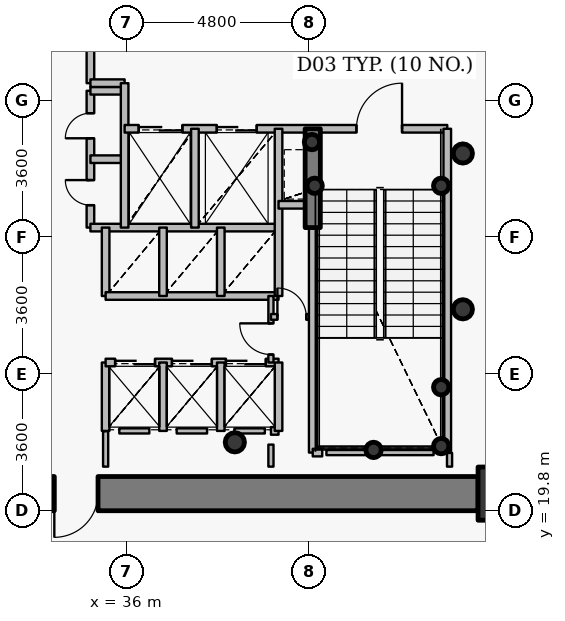
"""IFC4 building model, lengths in metres.
Left out: names, types, materials, properties, quantities, classifications, styles, units other than length and angle.
Written with IfcOpenShell. Run it as: python <this file> out.ifc"""

import sys

from ifc_helpers import new_model, si_unit, direction, frame, frame_2d, origin, origin_2d, place, context, subcontext, project, spatial, rectangle, hollow_circle, extrude, source, transform, mapped, element, fill, save


model = new_model("IFC4")
c1 = context("Model", 3, precision=1e-05, world=origin(), true_north=direction((0.0, 1.0)))
c2 = subcontext(c1, "Body", "Model", "MODEL_VIEW")
j1 = project(units=[si_unit("LENGTHUNIT", "METRE"), si_unit("PLANEANGLEUNIT", "RADIAN")], contexts=[c1])
p1 = place(None, origin())
s1 = spatial("IfcSite", under=j1, at=p1, CompositionType="ELEMENT")
p2 = place(p1, origin())
s2 = spatial("IfcBuilding", under=s1, at=p2, CompositionType="ELEMENT")
p3 = place(p2, frame((0.0, 0.0, 61.8)))
s3 = spatial("IfcBuildingStorey", under=s2, at=p3, CompositionType="ELEMENT", Elevation=61.8)
p4 = place(p3, frame((45.95, 20.25, 0.0), z_axis=(0.0, 0.0, 1.0), x_axis=(1.0, 0.0, 0.0)))
e1 = element("IfcColumn", 1, at=p4, inside=s3, PredefinedType="COLUMN", context=c2, shape_type="SweptSolid", body=[
    extrude(rectangle(XDim=1.4, YDim=1.4, at=origin_2d()), origin(), (0.0, 0.0, 1.0), 4.2),
])
p5 = place(p3, frame((38.85, 21.6, 0.0), z_axis=(0.0, 0.0, 1.0), x_axis=(1.0, 0.0, 0.0)))
e2 = element("IfcColumn", 2, at=p5, inside=s3, PredefinedType="COLUMN", context=c2, shape_type="SweptSolid", body=[
    extrude(hollow_circle(Radius=0.254, WallThickness=0.02, at=origin_2d()), origin(), (0.0, 0.0, 1.0), 4.2),
])
for number, where, z_axis, x_axis in (
    (3, (44.28, 21.5, 0.0), (0.0, 0.0, 1.0), (1.0, 0.0, 0.0)),
    (4, (44.28, 23.05, 0.0), (0.0, 0.0, 1.0), (1.0, 0.0, 0.0)),
    (5, (42.5, 21.4, 0.0), (0.0, 0.0, 1.0), (1.0, 0.0, 0.0)),
    (6, (40.95, 28.35, 0.0), (0.0, 0.0, 1.0), (1.0, 0.0, 0.0)),
    (7, (44.28, 28.35, 0.0), (0.0, 0.0, 1.0), (1.0, 0.0, 0.0)),
    (8, (40.88, 29.5, 0.0), (0.0, 0.0, 1.0), (1.0, 0.0, 0.0)),
):
    element("IfcColumn", number, at=place(p3, frame(where, z_axis=z_axis, x_axis=x_axis)), inside=s3, PredefinedType="COLUMN", context=c2, shape_type="SweptSolid", body=[
        extrude(hollow_circle(Radius=0.203, WallThickness=0.016, at=origin_2d()), origin(), (0.0, 0.0, 1.0), 4.2),
    ])
p6 = place(p3, frame((45.25, 20.25, 0.0), z_axis=(0.0, 0.0, 1.0), x_axis=(-1.0, 0.0, 0.0)))
e9 = element("IfcWall", 9, at=p6, inside=s3, PredefinedType="SHEAR", context=c2, shape_type="SweptSolid", body=[
    extrude(rectangle(XDim=18.5, YDim=0.9, at=frame_2d((9.25, 0.0))), origin(), (0.0, 0.0, 1.0), 3.4),
])
p7 = place(p6, frame((10.0, 0.0, 0.0)))
e10 = element("IfcOpeningElement", 10, at=p7, cuts=e9, PredefinedType="OPENING", context=c2, shape_type="SweptSolid", body=[
    extrude(rectangle(XDim=1.15, YDim=2.15, at=origin_2d()), frame((0.575, 0.46, 1.075), z_axis=(0.0, -1.0, 0.0), x_axis=(1.0, 0.0, 0.0)), (0.0, 0.0, 1.0), 0.92),
])
p8 = place(p3, frame((40.9, 27.25, 0.0), z_axis=(0.0, 0.0, 1.0), x_axis=(0.0, 1.0, 0.0)))
e11 = element("IfcWall", 11, at=p8, inside=s3, PredefinedType="SHEAR", context=c2, shape_type="SweptSolid", body=[
    extrude(rectangle(XDim=2.6, YDim=0.4, at=frame_2d((1.3, 0.0))), origin(), (0.0, 0.0, 1.0), 3.55),
])
for number, where, z_axis, x_axis in (
    (12, (44.85, 25.1, 0.0), (0.0, 0.0, 1.0), (1.0, 0.0, 0.0)),
    (13, (44.85, 29.2, 0.0), (0.0, 0.0, 1.0), (1.0, 0.0, 0.0)),
):
    element("IfcColumn", number, at=place(p3, frame(where, z_axis=z_axis, x_axis=x_axis)), inside=s3, PredefinedType="COLUMN", context=c2, shape_type="SweptSolid", body=[
        extrude(hollow_circle(Radius=0.254, WallThickness=0.02, at=origin_2d()), origin(), (0.0, 0.0, 1.0), 4.2),
    ])
p9 = place(p3, frame((35.05, 27.25, 0.0), z_axis=(0.0, 0.0, 1.0), x_axis=(0.0, 1.0, 0.0)))
e14 = element("IfcWall", 14, at=p9, inside=s3, PredefinedType="PARTITIONING", context=c2, shape_type="SweptSolid", body=[
    extrude(rectangle(XDim=3.6, YDim=0.2, at=frame_2d((1.8, 0.0))), origin(), (0.0, 0.0, 1.0), 3.95),
])
p10 = place(p9, frame((0.59, 0.0, 0.0)))
e15 = element("IfcOpeningElement", 15, at=p10, cuts=e14, PredefinedType="OPENING", context=c2, shape_type="SweptSolid", body=[
    extrude(rectangle(XDim=0.66, YDim=2.05, at=origin_2d()), frame((0.33, 0.11, 1.025), z_axis=(0.0, -1.0, 0.0), x_axis=(1.0, 0.0, 0.0)), (0.0, 0.0, 1.0), 0.22),
])
p11 = place(p9, frame((2.35, 0.0, 0.0)))
e16 = element("IfcOpeningElement", 16, at=p11, cuts=e14, PredefinedType="OPENING", context=c2, shape_type="SweptSolid", body=[
    extrude(rectangle(XDim=0.66, YDim=2.05, at=origin_2d()), frame((0.33, 0.11, 1.025), z_axis=(0.0, -1.0, 0.0), x_axis=(1.0, 0.0, 0.0)), (0.0, 0.0, 1.0), 0.22),
])
p12 = place(p3, frame((35.05, 27.25, 0.0), z_axis=(0.0, 0.0, 1.0), x_axis=(1.0, 0.0, 0.0)))
e17 = element("IfcWall", 17, at=p12, inside=s3, PredefinedType="PARTITIONING", context=c2, shape_type="SweptSolid", body=[
    extrude(rectangle(XDim=4.95, YDim=0.2, at=frame_2d((2.475, 0.0))), origin(), (0.0, 0.0, 1.0), 3.535),
])
for number, where, z_axis, x_axis in (
    (18, (35.05, 29.05, 0.0), (0.0, 0.0, 1.0), (1.0, 0.0, 0.0)),
    (19, (35.05, 30.85, 0.0), (0.0, 0.0, 1.0), (1.0, 0.0, 0.0)),
):
    element("IfcWall", number, at=place(p3, frame(where, z_axis=z_axis, x_axis=x_axis)), inside=s3, PredefinedType="PARTITIONING", context=c2, shape_type="SweptSolid", body=[
        extrude(rectangle(XDim=0.9, YDim=0.2, at=frame_2d((0.45, 0.0))), origin(), (0.0, 0.0, 1.0), 3.95),
    ])
p13 = place(p3, frame((35.05, 31.05, 0.0), z_axis=(0.0, 0.0, 1.0), x_axis=(0.0, 1.0, 0.0)))
e20 = element("IfcWall", 20, at=p13, inside=s3, PredefinedType="PARTITIONING", context=c2, shape_type="SweptSolid", body=[
    extrude(rectangle(XDim=2.25, YDim=0.2, at=frame_2d((1.125, 0.0))), origin(), (0.0, 0.0, 1.0), 3.535),
])
p14 = place(p3, frame((35.05, 31.05, 0.0), z_axis=(0.0, 0.0, 1.0), x_axis=(1.0, 0.0, 0.0)))
e21 = element("IfcWall", 21, at=p14, inside=s3, PredefinedType="PARTITIONING", context=c2, shape_type="SweptSolid", body=[
    extrude(rectangle(XDim=0.9, YDim=0.2, at=frame_2d((0.45, 0.0))), origin(), (0.0, 0.0, 1.0), 3.95),
])
p15 = place(p3, frame((35.45, 21.9, 0.0), z_axis=(0.0, 0.0, 1.0), x_axis=(0.0, 1.0, 0.0)))
e22 = element("IfcWall", 22, at=p15, inside=s3, PredefinedType="PARTITIONING", context=c2, shape_type="SweptSolid", body=[
    extrude(rectangle(XDim=1.8, YDim=0.2, at=frame_2d((0.9, 0.0))), origin(), (0.0, 0.0, 1.0), 3.95),
])
p16 = place(p3, frame((35.45, 23.7, 0.0), z_axis=(0.0, 0.0, 1.0), x_axis=(1.0, 0.0, 0.0)))
e23 = element("IfcWall", 23, at=p16, inside=s3, PredefinedType="PARTITIONING", context=c2, shape_type="SweptSolid", body=[
    extrude(rectangle(XDim=4.55, YDim=0.2, at=frame_2d((2.275, 0.0))), origin(), (0.0, 0.0, 1.0), 3.535),
])
p17 = place(p16, frame((0.25, 0.0, 0.0)))
e24 = element("IfcOpeningElement", 24, at=p17, cuts=e23, PredefinedType="OPENING", context=c2, shape_type="SweptSolid", body=[
    extrude(rectangle(XDim=1.05, YDim=2.15, at=origin_2d()), frame((0.525, 0.11, 1.075), z_axis=(0.0, -1.0, 0.0), x_axis=(1.0, 0.0, 0.0)), (0.0, 0.0, 1.0), 0.22),
])
p18 = place(p16, frame((1.745, 0.0, 0.0)))
e25 = element("IfcOpeningElement", 25, at=p18, cuts=e23, PredefinedType="OPENING", context=c2, shape_type="SweptSolid", body=[
    extrude(rectangle(XDim=1.05, YDim=2.15, at=origin_2d()), frame((0.525, 0.11, 1.075), z_axis=(0.0, -1.0, 0.0), x_axis=(1.0, 0.0, 0.0)), (0.0, 0.0, 1.0), 0.22),
])
p19 = place(p16, frame((3.165, 0.0, 0.0)))
e26 = element("IfcOpeningElement", 26, at=p19, cuts=e23, PredefinedType="OPENING", context=c2, shape_type="SweptSolid", body=[
    extrude(rectangle(XDim=1.05, YDim=2.15, at=origin_2d()), frame((0.525, 0.11, 1.075), z_axis=(0.0, -1.0, 0.0), x_axis=(1.0, 0.0, 0.0)), (0.0, 0.0, 1.0), 0.22),
])
p20 = place(p3, frame((35.45, 25.45, 0.0), z_axis=(0.0, 0.0, 1.0), x_axis=(0.0, 1.0, 0.0)))
e27 = element("IfcWall", 27, at=p20, inside=s3, PredefinedType="PARTITIONING", context=c2, shape_type="SweptSolid", body=[
    extrude(rectangle(XDim=1.8, YDim=0.2, at=frame_2d((0.9, 0.0))), origin(), (0.0, 0.0, 1.0), 3.95),
])
p21 = place(p3, frame((35.45, 25.45, 0.0), z_axis=(0.0, 0.0, 1.0), x_axis=(1.0, 0.0, 0.0)))
e28 = element("IfcWall", 28, at=p21, inside=s3, PredefinedType="PARTITIONING", context=c2, shape_type="SweptSolid", body=[
    extrude(rectangle(XDim=4.55, YDim=0.2, at=frame_2d((2.275, 0.0))), origin(), (0.0, 0.0, 1.0), 3.535),
])
p22 = place(p3, frame((35.95, 27.25, 0.0), z_axis=(0.0, 0.0, 1.0), x_axis=(0.0, 1.0, 0.0)))
e29 = element("IfcWall", 29, at=p22, inside=s3, PredefinedType="PARTITIONING", context=c2, shape_type="SweptSolid", body=[
    extrude(rectangle(XDim=3.8, YDim=0.2, at=frame_2d((1.9, 0.0))), origin(), (0.0, 0.0, 1.0), 3.95),
])
p23 = place(p3, frame((35.95, 29.85, 0.0), z_axis=(0.0, 0.0, 1.0), x_axis=(1.0, 0.0, 0.0)))
e30 = element("IfcWall", 30, at=p23, inside=s3, PredefinedType="PARTITIONING", context=c2, shape_type="SweptSolid", body=[
    extrude(rectangle(XDim=8.49, YDim=0.2, at=frame_2d((4.245, 0.0))), origin(), (0.0, 0.0, 1.0), 3.535),
])
p24 = place(p23, frame((6.1, 0.0, 0.0)))
e31 = element("IfcOpeningElement", 31, at=p24, cuts=e30, PredefinedType="OPENING", context=c2, shape_type="SweptSolid", body=[
    extrude(rectangle(XDim=1.2, YDim=2.15, at=origin_2d()), frame((0.6, 0.11, 1.075), z_axis=(0.0, -1.0, 0.0), x_axis=(1.0, 0.0, 0.0)), (0.0, 0.0, 1.0), 0.22),
])
p25 = place(p23, frame((0.37, 0.0, 0.0)))
e32 = element("IfcOpeningElement", 32, at=p25, cuts=e30, PredefinedType="OPENING", context=c2, shape_type="SweptSolid", body=[
    extrude(rectangle(XDim=1.15, YDim=2.15, at=origin_2d()), frame((0.575, 0.11, 1.075), z_axis=(0.0, -1.0, 0.0), x_axis=(1.0, 0.0, 0.0)), (0.0, 0.0, 1.0), 0.22),
])
p26 = place(p23, frame((2.425, 0.0, 0.0)))
e33 = element("IfcOpeningElement", 33, at=p26, cuts=e30, PredefinedType="OPENING", context=c2, shape_type="SweptSolid", body=[
    extrude(rectangle(XDim=1.05, YDim=2.15, at=origin_2d()), frame((0.525, 0.11, 1.075), z_axis=(0.0, -1.0, 0.0), x_axis=(1.0, 0.0, 0.0)), (0.0, 0.0, 1.0), 0.22),
])
for number, where, z_axis, x_axis in (
    (34, (36.96, 21.9, 0.0), (0.0, 0.0, 1.0), (0.0, 1.0, 0.0)),
    (35, (36.96, 25.45, 0.0), (0.0, 0.0, 1.0), (0.0, 1.0, 0.0)),
):
    element("IfcWall", number, at=place(p3, frame(where, z_axis=z_axis, x_axis=x_axis)), inside=s3, PredefinedType="PARTITIONING", context=c2, shape_type="SweptSolid", body=[
        extrude(rectangle(XDim=1.8, YDim=0.2, at=frame_2d((0.9, 0.0))), origin(), (0.0, 0.0, 1.0), 3.95),
    ])
p27 = place(p3, frame((37.8, 27.25, 0.0), z_axis=(0.0, 0.0, 1.0), x_axis=(0.0, 1.0, 0.0)))
e36 = element("IfcWall", 36, at=p27, inside=s3, PredefinedType="PARTITIONING", context=c2, shape_type="SweptSolid", body=[
    extrude(rectangle(XDim=2.6, YDim=0.2, at=frame_2d((1.3, 0.0))), origin(), (0.0, 0.0, 1.0), 3.95),
])
for number, where, z_axis, x_axis in (
    (37, (38.48, 21.9, 0.0), (0.0, 0.0, 1.0), (0.0, 1.0, 0.0)),
    (38, (38.48, 25.45, 0.0), (0.0, 0.0, 1.0), (0.0, 1.0, 0.0)),
):
    element("IfcWall", number, at=place(p3, frame(where, z_axis=z_axis, x_axis=x_axis)), inside=s3, PredefinedType="PARTITIONING", context=c2, shape_type="SweptSolid", body=[
        extrude(rectangle(XDim=1.8, YDim=0.2, at=frame_2d((0.9, 0.0))), origin(), (0.0, 0.0, 1.0), 3.95),
    ])
p28 = place(p3, frame((39.8, 21.9, 0.0), z_axis=(0.0, 0.0, 1.0), x_axis=(1.0, 0.0, 0.0)))
e39 = element("IfcWall", 39, at=p28, inside=s3, PredefinedType="PARTITIONING", context=c2, shape_type="SweptSolid", body=[
    extrude(rectangle(XDim=0.2, YDim=0.2, at=frame_2d((0.1, 0.0))), origin(), (0.0, 0.0, 1.0), 3.95),
])
p29 = place(p3, frame((39.8, 23.7, 0.0), z_axis=(0.0, 0.0, 1.0), x_axis=(0.0, 1.0, 0.0)))
e40 = element("IfcWall", 40, at=p29, inside=s3, PredefinedType="PARTITIONING", context=c2, shape_type="SweptSolid", body=[
    extrude(rectangle(XDim=1.75, YDim=0.135, at=frame_2d((0.875, 0.0))), origin(), (0.0, 0.0, 1.0), 3.95),
])
p30 = place(p29, frame((0.21, 0.0, 0.0)))
e41 = element("IfcOpeningElement", 41, at=p30, cuts=e40, PredefinedType="OPENING", context=c2, shape_type="SweptSolid", body=[
    extrude(rectangle(XDim=0.82, YDim=2.1, at=origin_2d()), frame((0.41, 0.078, 1.05), z_axis=(0.0, -1.0, 0.0), x_axis=(1.0, 0.0, 0.0)), (0.0, 0.0, 1.0), 0.155),
])
p31 = place(p3, frame((39.8, 24.9, 0.0), z_axis=(0.0, 0.0, 1.0), x_axis=(1.0, 0.0, 0.0)))
e42 = element("IfcWall", 42, at=p31, inside=s3, PredefinedType="PARTITIONING", context=c2, shape_type="SweptSolid", body=[
    extrude(rectangle(XDim=1.1, YDim=0.15, at=frame_2d((0.55, 0.0))), origin(), (0.0, 0.0, 1.0), 3.95),
])
p32 = place(p31, frame((0.17, 0.0, 0.0)))
e43 = element("IfcOpeningElement", 43, at=p32, cuts=e42, PredefinedType="OPENING", context=c2, shape_type="SweptSolid", body=[
    extrude(rectangle(XDim=0.76, YDim=2.1, at=origin_2d()), frame((0.38, 0.085, 1.05), z_axis=(0.0, -1.0, 0.0), x_axis=(1.0, 0.0, 0.0)), (0.0, 0.0, 1.0), 0.17),
])
p33 = place(p3, frame((40.0, 21.9, 0.0), z_axis=(0.0, 0.0, 1.0), x_axis=(0.0, 1.0, 0.0)))
e44 = element("IfcWall", 44, at=p33, inside=s3, PredefinedType="PARTITIONING", context=c2, shape_type="SweptSolid", body=[
    extrude(rectangle(XDim=1.8, YDim=0.2, at=frame_2d((0.9, 0.0))), origin(), (0.0, 0.0, 1.0), 3.95),
])
p34 = place(p3, frame((40.0, 25.45, 0.0), z_axis=(0.0, 0.0, 1.0), x_axis=(0.0, 1.0, 0.0)))
e45 = element("IfcWall", 45, at=p34, inside=s3, PredefinedType="PARTITIONING", context=c2, shape_type="SweptSolid", body=[
    extrude(rectangle(XDim=4.4, YDim=0.2, at=frame_2d((2.2, 0.0))), origin(), (0.0, 0.0, 1.0), 3.95),
])
p35 = place(p3, frame((40.0, 27.85, 0.0), z_axis=(0.0, 0.0, 1.0), x_axis=(1.0, 0.0, 0.0)))
e46 = element("IfcWall", 46, at=p35, inside=s3, PredefinedType="PARTITIONING", context=c2, shape_type="SweptSolid", body=[
    extrude(rectangle(XDim=0.9, YDim=0.2, at=frame_2d((0.45, 0.0))), origin(), (0.0, 0.0, 1.0), 3.95),
])
p36 = place(p3, frame((40.9, 21.33, 0.0), z_axis=(0.0, 0.0, 1.0), x_axis=(0.0, 1.0, 0.0)))
e47 = element("IfcWall", 47, at=p36, inside=s3, PredefinedType="PARTITIONING", context=c2, shape_type="SweptSolid", body=[
    extrude(rectangle(XDim=5.91, YDim=0.2, at=frame_2d((2.955, 0.0))), origin(), (0.0, 0.0, 1.0), 3.485),
])
p37 = place(p3, frame((40.9, 21.33, 0.0), z_axis=(0.0, 0.0, 1.0), x_axis=(1.0, 0.0, 0.0)))
e48 = element("IfcWall", 48, at=p37, inside=s3, PredefinedType="PARTITIONING", context=c2, shape_type="SweptSolid", body=[
    extrude(rectangle(XDim=0.25, YDim=0.2, at=frame_2d((0.125, 0.0))), origin(), (0.0, 0.0, 1.0), 3.485),
])
p38 = place(p3, frame((44.44, 21.33, 0.0), z_axis=(0.0, 0.0, 1.0), x_axis=(0.0, 1.0, 0.0)))
e49 = element("IfcWall", 49, at=p38, inside=s3, PredefinedType="PARTITIONING", context=c2, shape_type="SweptSolid", body=[
    extrude(rectangle(XDim=8.52, YDim=0.2, at=frame_2d((4.26, 0.0))), origin(), (0.0, 0.0, 1.0), 3.95),
])
p39 = place(p3, frame((44.08, 21.33, 0.0), z_axis=(0.0, 0.0, 1.0), x_axis=(-1.0, 0.0, 0.0)))
e50 = element("IfcWall", 50, at=p39, inside=s3, PredefinedType="PARTITIONING", context=c2, shape_type="SweptSolid", body=[
    extrude(rectangle(XDim=2.82, YDim=0.135, at=frame_2d((1.41, 0.0))), origin(), (0.0, 0.0, 1.0), 3.485),
])
p40 = place(p3, frame((36.6, 21.9, 0.0), z_axis=(0.0, 0.0, 1.0), x_axis=(-1.0, 0.0, 0.0)))
e51 = element("IfcWall", 51, at=p40, inside=s3, PredefinedType="PARTITIONING", context=c2, shape_type="SweptSolid", body=[
    extrude(rectangle(XDim=0.79, YDim=0.135, at=frame_2d((0.395, 0.0))), origin(), (0.0, 0.0, 1.0), 3.95),
])
p41 = place(p3, frame((38.12, 21.9, 0.0), z_axis=(0.0, 0.0, 1.0), x_axis=(-1.0, 0.0, 0.0)))
e52 = element("IfcWall", 52, at=p41, inside=s3, PredefinedType="PARTITIONING", context=c2, shape_type="SweptSolid", body=[
    extrude(rectangle(XDim=0.8, YDim=0.135, at=frame_2d((0.4, 0.0))), origin(), (0.0, 0.0, 1.0), 3.95),
])
p42 = place(p3, frame((39.64, 21.9, 0.0), z_axis=(0.0, 0.0, 1.0), x_axis=(-1.0, 0.0, 0.0)))
e53 = element("IfcWall", 53, at=p42, inside=s3, PredefinedType="PARTITIONING", context=c2, shape_type="SweptSolid", body=[
    extrude(rectangle(XDim=0.8, YDim=0.135, at=frame_2d((0.4, 0.0))), origin(), (0.0, 0.0, 1.0), 3.535),
])
p43 = place(p3, frame((39.8, 20.96, 0.0), z_axis=(0.0, 0.0, 1.0), x_axis=(0.0, 1.0, 0.0)))
e54 = element("IfcWall", 54, at=p43, inside=s3, PredefinedType="PARTITIONING", context=c2, shape_type="SweptSolid", body=[
    extrude(rectangle(XDim=0.58, YDim=0.135, at=frame_2d((0.29, 0.0))), origin(), (0.0, 0.0, 1.0), 3.485),
])
p44 = place(p3, frame((44.5, 20.96, 0.0), z_axis=(0.0, 0.0, 1.0), x_axis=(0.0, 1.0, 0.0)))
e55 = element("IfcWall", 55, at=p44, inside=s3, PredefinedType="PARTITIONING", context=c2, shape_type="SweptSolid", body=[
    extrude(rectangle(XDim=0.36, YDim=0.135, at=frame_2d((0.18, 0.0))), origin(), (0.0, 0.0, 1.0), 3.95),
])
p45 = place(p3, frame((35.45, 21.89, 0.0), z_axis=(0.0, 0.0, 1.0), x_axis=(0.0, -1.0, 0.0)))
e56 = element("IfcWall", 56, at=p45, inside=s3, PredefinedType="PARTITIONING", context=c2, shape_type="SweptSolid", body=[
    extrude(rectangle(XDim=0.93, YDim=0.135, at=frame_2d((0.465, 0.0))), origin(), (0.0, 0.0, 1.0), 3.535),
])
p46 = place(p3, frame((45.26, 19.8, 0.0), z_axis=(0.0, 0.0, 1.0), x_axis=(1.0, 0.0, 0.0)))
e57 = element("IfcWall", 57, at=p46, inside=s3, PredefinedType="PARTITIONING", context=c2, shape_type="SweptSolid", body=[
    extrude(rectangle(XDim=1.14, YDim=0.135, at=frame_2d((0.57, 0.0))), origin(), (0.0, 0.0, 1.0), 3.285),
])
m1 = source(origin(), c2, "Body", "SweptSolid", [
    extrude(rectangle(XDim=1.15, YDim=2.15, at=origin_2d()), frame((0.575, 0.025, 1.075), z_axis=(0.0, -1.0, 0.0), x_axis=(1.0, 0.0, 0.0)), (0.0, 0.0, 1.0), 0.05),
])
p47 = place(p7, origin())
e58 = element("IfcDoor", 58, at=p47, inside=s3, OperationType="SINGLE_SWING_RIGHT", PredefinedType="DOOR", context=c2, shape_type="MappedRepresentation", body=[
    mapped(m1, transform((0.0, 0.0, 0.0), x_axis=(1.0, 0.0, 0.0), y_axis=(0.0, 1.0, 0.0), z_axis=(0.0, 0.0, 1.0), scale=1.0)),
])
fill(e10, e58)
m2 = source(origin(), c2, "Body", "SweptSolid", [
    extrude(rectangle(XDim=1.2, YDim=2.15, at=origin_2d()), frame((0.6, 0.025, 1.075), z_axis=(0.0, -1.0, 0.0), x_axis=(1.0, 0.0, 0.0)), (0.0, 0.0, 1.0), 0.05),
])
p48 = place(p24, origin())
e59 = element("IfcDoor", 59, at=p48, inside=s3, OperationType="SINGLE_SWING_RIGHT", PredefinedType="DOOR", context=c2, shape_type="MappedRepresentation", body=[
    mapped(m2, transform((0.0, 0.0, 0.0), x_axis=(1.0, 0.0, 0.0), y_axis=(0.0, 1.0, 0.0), z_axis=(0.0, 0.0, 1.0), scale=1.0)),
])
fill(e31, e59)
m3 = source(origin(), c2, "Body", "SweptSolid", [
    extrude(rectangle(XDim=1.15, YDim=2.15, at=origin_2d()), frame((0.575, 0.025, 1.075), z_axis=(0.0, -1.0, 0.0), x_axis=(1.0, 0.0, 0.0)), (0.0, 0.0, 1.0), 0.05),
])
p49 = place(p25, origin())
e60 = element("IfcDoor", 60, at=p49, inside=s3, OperationType="DOUBLE_DOOR_SLIDING", PredefinedType="USERDEFINED", context=c2, shape_type="MappedRepresentation", body=[
    mapped(m3, transform((0.0, 0.0, 0.0), x_axis=(1.0, 0.0, 0.0), y_axis=(0.0, 1.0, 0.0), z_axis=(0.0, 0.0, 1.0), scale=1.0)),
])
fill(e32, e60)
m4 = source(origin(), c2, "Body", "SweptSolid", [
    extrude(rectangle(XDim=1.05, YDim=2.15, at=origin_2d()), frame((0.525, 0.025, 1.075), z_axis=(0.0, -1.0, 0.0), x_axis=(1.0, 0.0, 0.0)), (0.0, 0.0, 1.0), 0.05),
])
p50 = place(p26, origin())
e61 = element("IfcDoor", 61, at=p50, inside=s3, OperationType="DOUBLE_DOOR_SLIDING", PredefinedType="USERDEFINED", context=c2, shape_type="MappedRepresentation", body=[
    mapped(m4, transform((0.0, 0.0, 0.0), x_axis=(1.0, 0.0, 0.0), y_axis=(0.0, 1.0, 0.0), z_axis=(0.0, 0.0, 1.0), scale=1.0)),
])
fill(e33, e61)
p51 = place(p17, origin())
e62 = element("IfcDoor", 62, at=p51, inside=s3, OperationType="DOUBLE_DOOR_SLIDING", PredefinedType="USERDEFINED", context=c2, shape_type="MappedRepresentation", body=[
    mapped(m4, transform((0.0, 0.0, 0.0), x_axis=(1.0, 0.0, 0.0), y_axis=(0.0, 1.0, 0.0), z_axis=(0.0, 0.0, 1.0), scale=1.0)),
])
fill(e24, e62)
p52 = place(p18, origin())
e63 = element("IfcDoor", 63, at=p52, inside=s3, OperationType="DOUBLE_DOOR_SLIDING", PredefinedType="USERDEFINED", context=c2, shape_type="MappedRepresentation", body=[
    mapped(m4, transform((0.0, 0.0, 0.0), x_axis=(1.0, 0.0, 0.0), y_axis=(0.0, 1.0, 0.0), z_axis=(0.0, 0.0, 1.0), scale=1.0)),
])
fill(e25, e63)
p53 = place(p19, origin())
e64 = element("IfcDoor", 64, at=p53, inside=s3, OperationType="DOUBLE_DOOR_SLIDING", PredefinedType="USERDEFINED", context=c2, shape_type="MappedRepresentation", body=[
    mapped(m4, transform((0.0, 0.0, 0.0), x_axis=(1.0, 0.0, 0.0), y_axis=(0.0, 1.0, 0.0), z_axis=(0.0, 0.0, 1.0), scale=1.0)),
])
fill(e26, e64)
m5 = source(origin(), c2, "Body", "SweptSolid", [
    extrude(rectangle(XDim=0.66, YDim=2.05, at=origin_2d()), frame((0.33, 0.025, 1.025), z_axis=(0.0, -1.0, 0.0), x_axis=(1.0, 0.0, 0.0)), (0.0, 0.0, 1.0), 0.05),
])
p54 = place(p10, origin())
e65 = element("IfcDoor", 65, at=p54, inside=s3, OperationType="SINGLE_SWING_RIGHT", PredefinedType="USERDEFINED", context=c2, shape_type="MappedRepresentation", body=[
    mapped(m5, transform((0.0, 0.0, 0.0), x_axis=(1.0, 0.0, 0.0), y_axis=(0.0, 1.0, 0.0), z_axis=(0.0, 0.0, 1.0), scale=1.0)),
])
fill(e15, e65)
p55 = place(p11, origin())
e66 = element("IfcDoor", 66, at=p55, inside=s3, OperationType="SINGLE_SWING_LEFT", PredefinedType="USERDEFINED", context=c2, shape_type="MappedRepresentation", body=[
    mapped(m5, transform((0.0, 0.0, 0.0), x_axis=(1.0, 0.0, 0.0), y_axis=(0.0, 1.0, 0.0), z_axis=(0.0, 0.0, 1.0), scale=1.0)),
])
fill(e16, e66)
m6 = source(origin(), c2, "Body", "SweptSolid", [
    extrude(rectangle(XDim=0.82, YDim=2.1, at=origin_2d()), frame((0.41, 0.025, 1.05), z_axis=(0.0, -1.0, 0.0), x_axis=(1.0, 0.0, 0.0)), (0.0, 0.0, 1.0), 0.05),
])
p56 = place(p30, origin())
e67 = element("IfcDoor", 67, at=p56, inside=s3, OperationType="SINGLE_SWING_RIGHT", PredefinedType="DOOR", context=c2, shape_type="MappedRepresentation", body=[
    mapped(m6, transform((0.0, 0.0, 0.0), x_axis=(1.0, 0.0, 0.0), y_axis=(0.0, 1.0, 0.0), z_axis=(0.0, 0.0, 1.0), scale=1.0)),
])
fill(e41, e67)
m7 = source(origin(), c2, "Body", "SweptSolid", [
    extrude(rectangle(XDim=0.76, YDim=2.1, at=origin_2d()), frame((0.38, 0.025, 1.05), z_axis=(0.0, -1.0, 0.0), x_axis=(1.0, 0.0, 0.0)), (0.0, 0.0, 1.0), 0.05),
])
p57 = place(p32, origin())
e68 = element("IfcDoor", 68, at=p57, inside=s3, OperationType="SINGLE_SWING_LEFT", PredefinedType="DOOR", context=c2, shape_type="MappedRepresentation", body=[
    mapped(m7, transform((0.0, 0.0, 0.0), x_axis=(1.0, 0.0, 0.0), y_axis=(0.0, 1.0, 0.0), z_axis=(0.0, 0.0, 1.0), scale=1.0)),
])
fill(e43, e68)
save(model, sys.argv[1])
